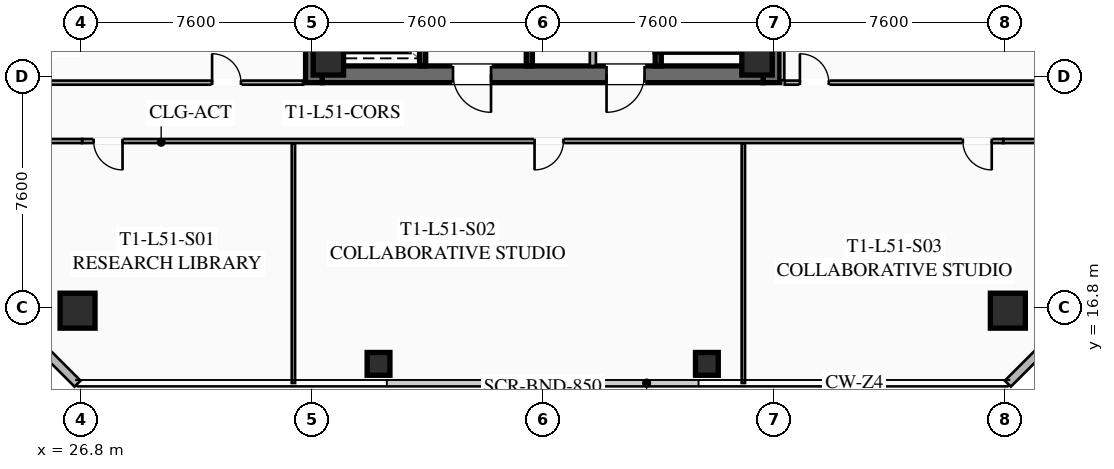
"""IFC4 building model, lengths in metres.
Left out: names, types, materials, properties, quantities, classifications, styles, units other than length and angle.
Written with IfcOpenShell. Run it as: python <this file> out.ifc"""

import sys

from ifc_helpers import new_model, si_unit, direction, frame, frame_2d, origin, origin_2d, place, context, subcontext, project, spatial, rectangle, hollow_rectangle, extrude, element, fill, save


model = new_model("IFC4")
c1 = context("Model", 3, precision=1e-05, world=origin(), true_north=direction((0.0, 1.0)))
c2 = subcontext(c1, "Body", "Model", "MODEL_VIEW")
j1 = project(units=[si_unit("LENGTHUNIT", "METRE"), si_unit("PLANEANGLEUNIT", "RADIAN")], contexts=[c1])
p1 = place(None, origin())
s1 = spatial("IfcSite", under=j1, at=p1, CompositionType="ELEMENT")
p2 = place(p1, origin())
s2 = spatial("IfcBuilding", under=s1, at=p2, CompositionType="ELEMENT")
p3 = place(p2, frame((0.0, 0.0, 188.95)))
s3 = spatial("IfcBuildingStorey", under=s2, at=p3, CompositionType="ELEMENT", Elevation=188.95)
for number, where, z_axis, x_axis in (
    (1, (34.475, 24.2, 0.0), (0.0, 0.0, 1.0), (0.0, 1.0, 0.0)),
    (2, (49.525, 39.8, 0.0), (0.0, 0.0, 1.0), (0.0, -1.0, 0.0)),
):
    element("IfcWall", number, at=place(p3, frame(where, z_axis=z_axis, x_axis=x_axis)), inside=s3, PredefinedType="SHEAR", context=c2, shape_type="SweptSolid", body=[
        extrude(rectangle(XDim=15.6, YDim=0.55, at=frame_2d((7.8, 0.0))), origin(), (0.0, 0.0, 1.0), 3.55),
    ])
p4 = place(p3, frame((49.25, 24.475, 0.0), z_axis=(0.0, 0.0, 1.0), x_axis=(-1.0, 0.0, 0.0)))
e3 = element("IfcWall", 3, at=p4, inside=s3, PredefinedType="SHEAR", context=c2, shape_type="SweptSolid", body=[
    extrude(rectangle(XDim=14.5, YDim=0.55, at=frame_2d((7.25, 0.0))), origin(), (0.0, 0.0, 1.0), 3.55),
])
p5 = place(p4, frame((8.95, 0.0, 0.0)))
e4 = element("IfcOpeningElement", 4, at=p5, cuts=e3, PredefinedType="OPENING", context=c2, shape_type="SweptSolid", body=[
    extrude(rectangle(XDim=1.25, YDim=2.25, at=frame_2d((0.625, 1.125))), frame((0.0, 0.285, 0.0), z_axis=(0.0, -1.0, 0.0), x_axis=(1.0, 0.0, 0.0)), (0.0, 0.0, 1.0), 0.57),
])
p6 = place(p4, frame((3.9, 0.0, 0.0)))
e5 = element("IfcOpeningElement", 5, at=p6, cuts=e3, PredefinedType="OPENING", context=c2, shape_type="SweptSolid", body=[
    extrude(rectangle(XDim=1.25, YDim=2.25, at=frame_2d((0.625, 1.125))), frame((0.0, 0.285, 0.0), z_axis=(0.0, -1.0, 0.0), x_axis=(1.0, 0.0, 0.0)), (0.0, 0.0, 1.0), 0.57),
])
for number, where, z_axis, x_axis in (
    (6, (34.95, 24.95, 0.0), (0.0, 0.0, 1.0), (1.0, 0.0, 0.0)),
    (7, (49.05, 24.95, 0.0), (0.0, 0.0, 1.0), (1.0, 0.0, 0.0)),
):
    element("IfcColumn", number, at=place(p3, frame(where, z_axis=z_axis, x_axis=x_axis)), inside=s3, PredefinedType="COLUMN", context=c2, shape_type="SweptSolid", body=[
        extrude(hollow_rectangle(XDim=1.0, YDim=1.0, WallThickness=0.04, at=origin_2d()), origin(), (0.0, 0.0, 1.0), 3.37),
    ])
for number, where, z_axis, x_axis in (
    (8, (26.7, 16.7, 0.0), (0.0, 0.0, 1.0), (1.0, 0.0, 0.0)),
    (9, (57.3, 16.7, 0.0), (0.0, 0.0, 1.0), (1.0, 0.0, 0.0)),
):
    element("IfcColumn", number, at=place(p3, frame(where, z_axis=z_axis, x_axis=x_axis)), inside=s3, PredefinedType="COLUMN", context=c2, shape_type="SweptSolid", body=[
        extrude(hollow_rectangle(XDim=1.15, YDim=1.15, WallThickness=0.045, at=origin_2d()), origin(), (0.0, 0.0, 1.0), 3.37),
    ])
for number, where, z_axis, x_axis in (
    (10, (36.6, 14.95, 0.0), (0.0, 0.0, 1.0), (1.0, 0.0, 0.0)),
    (11, (47.4, 14.95, 0.0), (0.0, 0.0, 1.0), (1.0, 0.0, 0.0)),
):
    element("IfcColumn", number, at=place(p3, frame(where, z_axis=z_axis, x_axis=x_axis)), inside=s3, PredefinedType="COLUMN", context=c2, shape_type="SweptSolid", body=[
        extrude(hollow_rectangle(XDim=0.75, YDim=0.75, WallThickness=0.032, at=origin_2d()), origin(), (0.0, 0.0, 1.0), 3.37),
    ])
for number, where, z_axis, x_axis in (
    (12, (26.7, 14.3, 0.0), (0.0, 0.0, 1.0), (-0.707, 0.707, 0.0)),
    (13, (59.7, 16.7, 0.0), (0.0, 0.0, 1.0), (-0.707, -0.707, 0.0)),
):
    element("IfcWall", number, at=place(p3, frame(where, z_axis=z_axis, x_axis=x_axis)), inside=s3, PredefinedType="SOLIDWALL", context=c2, shape_type="SweptSolid", body=[
        extrude(rectangle(XDim=3.394, YDim=0.28, at=frame_2d((1.697, 0.0))), origin(), (0.0, 0.0, 1.0), 3.37),
    ])
p7 = place(p3, frame((45.8, 32.8, 0.0), z_axis=(0.0, 0.0, 1.0), x_axis=(0.0, -1.0, 0.0)))
e14 = element("IfcWall", 14, at=p7, inside=s3, PredefinedType="SHEAR", context=c2, shape_type="SweptSolid", body=[
    extrude(rectangle(XDim=8.05, YDim=0.2, at=frame_2d((4.025, 0.0))), origin(), (0.0, 0.0, 1.0), 3.37),
])
p8 = place(p7, frame((0.45, 0.0, 0.0)))
e15 = element("IfcOpeningElement", 15, at=p8, cuts=e14, PredefinedType="OPENING", context=c2, shape_type="SweptSolid", body=[
    extrude(rectangle(XDim=1.15, YDim=2.2, at=frame_2d((0.575, 1.1))), frame((0.0, 0.11, 0.0), z_axis=(0.0, -1.0, 0.0), x_axis=(1.0, 0.0, 0.0)), (0.0, 0.0, 1.0), 0.22),
])
p9 = place(p3, frame((41.56, 24.75, 0.0), z_axis=(0.0, 0.0, 1.0), x_axis=(0.0, 1.0, 0.0)))
e16 = element("IfcWall", 16, at=p9, inside=s3, PredefinedType="SHEAR", context=c2, shape_type="SweptSolid", body=[
    extrude(rectangle(XDim=14.5, YDim=0.2, at=frame_2d((7.25, 0.0))), origin(), (0.0, 0.0, 1.0), 3.37),
])
p10 = place(p3, frame((38.05, 24.75, 0.0), z_axis=(0.0, 0.0, 1.0), x_axis=(0.0, 1.0, 0.0)))
e17 = element("IfcWall", 17, at=p10, inside=s3, PredefinedType="SHEAR", context=c2, shape_type="SweptSolid", body=[
    extrude(rectangle(XDim=6.45, YDim=0.2, at=frame_2d((3.225, 0.0))), origin(), (0.0, 0.0, 1.0), 3.37),
])
p11 = place(p10, frame((4.875, 0.0, 0.0)))
e18 = element("IfcOpeningElement", 18, at=p11, cuts=e17, PredefinedType="OPENING", context=c2, shape_type="SweptSolid", body=[
    extrude(rectangle(XDim=1.3, YDim=2.25, at=frame_2d((0.65, 1.125))), frame((0.0, 0.11, 0.0), z_axis=(0.0, -1.0, 0.0), x_axis=(1.0, 0.0, 0.0)), (0.0, 0.0, 1.0), 0.22),
])
p12 = place(p10, frame((2.875, 0.0, 0.0)))
e19 = element("IfcOpeningElement", 19, at=p12, cuts=e17, PredefinedType="OPENING", context=c2, shape_type="SweptSolid", body=[
    extrude(rectangle(XDim=1.3, YDim=2.25, at=frame_2d((0.65, 1.125))), frame((0.0, 0.11, 0.0), z_axis=(0.0, -1.0, 0.0), x_axis=(1.0, 0.0, 0.0)), (0.0, 0.0, 1.0), 0.22),
])
p13 = place(p10, frame((0.675, 0.0, 0.0)))
e20 = element("IfcOpeningElement", 20, at=p13, cuts=e17, PredefinedType="OPENING", context=c2, shape_type="SweptSolid", body=[
    extrude(rectangle(XDim=1.3, YDim=2.25, at=frame_2d((0.65, 1.125))), frame((0.0, 0.11, 0.0), z_axis=(0.0, -1.0, 0.0), x_axis=(1.0, 0.0, 0.0)), (0.0, 0.0, 1.0), 0.22),
])
p14 = place(p3, frame((43.65, 24.75, 0.0), z_axis=(0.0, 0.0, 1.0), x_axis=(0.0, 1.0, 0.0)))
e21 = element("IfcWall", 21, at=p14, inside=s3, PredefinedType="SOLIDWALL", context=c2, shape_type="SweptSolid", body=[
    extrude(rectangle(XDim=6.9, YDim=0.2, at=frame_2d((3.45, 0.0))), origin(), (0.0, 0.0, 1.0), 2.723),
])
p15 = place(p14, frame((0.85, 0.0, 0.0)))
e22 = element("IfcOpeningElement", 22, at=p15, cuts=e21, PredefinedType="OPENING", context=c2, shape_type="SweptSolid", body=[
    extrude(rectangle(XDim=0.95, YDim=2.05, at=frame_2d((0.475, 1.025))), frame((0.0, 0.11, 0.0), z_axis=(0.0, -1.0, 0.0), x_axis=(1.0, 0.0, 0.0)), (0.0, 0.0, 1.0), 0.22),
])
p16 = place(p14, frame((4.8, 0.0, 0.0)))
e23 = element("IfcOpeningElement", 23, at=p16, cuts=e21, PredefinedType="OPENING", context=c2, shape_type="SweptSolid", body=[
    extrude(rectangle(XDim=1.05, YDim=2.2, at=frame_2d((0.525, 1.1))), frame((0.0, 0.11, 0.0), z_axis=(0.0, -1.0, 0.0), x_axis=(1.0, 0.0, 0.0)), (0.0, 0.0, 1.0), 0.22),
])
p17 = place(p3, frame((57.15, 22.28, 0.0), z_axis=(0.0, 0.0, 1.0), x_axis=(-1.0, 0.0, 0.0)))
e24 = element("IfcWall", 24, at=p17, inside=s3, PredefinedType="PARTITIONING", context=c2, shape_type="SweptSolid", body=[
    extrude(rectangle(XDim=30.3, YDim=0.135, at=frame_2d((15.15, 0.0))), origin(), (0.0, 0.0, 1.0), 2.723),
])
p18 = place(p17, frame((28.97, 0.0, 0.0)))
e25 = element("IfcOpeningElement", 25, at=p18, cuts=e24, PredefinedType="OPENING", context=c2, shape_type="SweptSolid", body=[
    extrude(rectangle(XDim=0.95, YDim=2.05, at=frame_2d((0.475, 1.025))), frame((0.0, 0.077, 0.0), z_axis=(0.0, -1.0, 0.0), x_axis=(1.0, 0.0, 0.0)), (0.0, 0.0, 1.0), 0.155),
])
p19 = place(p17, frame((14.468, 0.0, 0.0)))
e26 = element("IfcOpeningElement", 26, at=p19, cuts=e24, PredefinedType="OPENING", context=c2, shape_type="SweptSolid", body=[
    extrude(rectangle(XDim=0.95, YDim=2.05, at=frame_2d((0.475, 1.025))), frame((0.0, 0.077, 0.0), z_axis=(0.0, -1.0, 0.0), x_axis=(1.0, 0.0, 0.0)), (0.0, 0.0, 1.0), 0.155),
])
p20 = place(p17, frame((0.38, 0.0, 0.0)))
e27 = element("IfcOpeningElement", 27, at=p20, cuts=e24, PredefinedType="OPENING", context=c2, shape_type="SweptSolid", body=[
    extrude(rectangle(XDim=0.95, YDim=2.05, at=frame_2d((0.475, 1.025))), frame((0.0, 0.077, 0.0), z_axis=(0.0, -1.0, 0.0), x_axis=(1.0, 0.0, 0.0)), (0.0, 0.0, 1.0), 0.155),
])
for number, where, z_axis, x_axis in (
    (28, (24.32, 22.28, 0.0), (0.0, 0.0, 1.0), (1.0, 0.0, 0.0)),
    (29, (57.15, 22.28, 0.0), (0.0, 0.0, 1.0), (1.0, 0.0, 0.0)),
):
    element("IfcWall", number, at=place(p3, frame(where, z_axis=z_axis, x_axis=x_axis)), inside=s3, PredefinedType="PARTITIONING", context=c2, shape_type="SweptSolid", body=[
        extrude(rectangle(XDim=2.53, YDim=0.135, at=frame_2d((1.265, 0.0))), origin(), (0.0, 0.0, 1.0), 2.723),
    ])
for number, where, z_axis, x_axis in (
    (30, (33.8, 14.32, 0.0), (0.0, 0.0, 1.0), (0.0, 1.0, 0.0)),
    (31, (48.6, 14.32, 0.0), (0.0, 0.0, 1.0), (0.0, 1.0, 0.0)),
):
    element("IfcWall", number, at=place(p3, frame(where, z_axis=z_axis, x_axis=x_axis)), inside=s3, PredefinedType="PARTITIONING", context=c2, shape_type="SweptSolid", body=[
        extrude(rectangle(XDim=7.88, YDim=0.11, at=frame_2d((3.94, 0.0))), origin(), (0.0, 0.0, 1.0), 2.723),
    ])
p21 = place(p3, frame((49.88, 39.72, 0.0), z_axis=(0.0, 0.0, 1.0), x_axis=(0.0, -1.0, 0.0)))
e32 = element("IfcWall", 32, at=p21, inside=s3, PredefinedType="PARTITIONING", context=c2, shape_type="SweptSolid", body=[
    extrude(rectangle(XDim=15.44, YDim=0.135, at=frame_2d((7.72, 0.0))), origin(), (0.0, 0.0, 1.0), 2.723),
])
p22 = place(p3, frame((49.96, 24.2, 0.0), z_axis=(0.0, 0.0, 1.0), x_axis=(1.0, 0.0, 0.0)))
e33 = element("IfcWall", 33, at=p22, inside=s3, PredefinedType="PARTITIONING", context=c2, shape_type="SweptSolid", body=[
    extrude(rectangle(XDim=9.72, YDim=0.135, at=frame_2d((4.86, 0.0))), origin(), (0.0, 0.0, 1.0), 2.723),
])
p23 = place(p22, frame((0.5, 0.0, 0.0)))
e34 = element("IfcOpeningElement", 34, at=p23, cuts=e33, PredefinedType="OPENING", context=c2, shape_type="SweptSolid", body=[
    extrude(rectangle(XDim=0.95, YDim=2.05, at=frame_2d((0.475, 1.025))), frame((0.0, 0.077, 0.0), z_axis=(0.0, -1.0, 0.0), x_axis=(1.0, 0.0, 0.0)), (0.0, 0.0, 1.0), 0.155),
])
p24 = place(p3, frame((24.47, 24.2, 0.0), z_axis=(0.0, 0.0, 1.0), x_axis=(1.0, 0.0, 0.0)))
e35 = element("IfcWall", 35, at=p24, inside=s3, PredefinedType="PARTITIONING", context=c2, shape_type="SweptSolid", body=[
    extrude(rectangle(XDim=9.65, YDim=0.135, at=frame_2d((4.825, 0.0))), origin(), (0.0, 0.0, 1.0), 2.723),
])
p25 = place(p24, frame((6.655, 0.0, 0.0)))
e36 = element("IfcOpeningElement", 36, at=p25, cuts=e35, PredefinedType="OPENING", context=c2, shape_type="SweptSolid", body=[
    extrude(rectangle(XDim=0.95, YDim=2.05, at=frame_2d((0.475, 1.025))), frame((0.0, 0.077, 0.0), z_axis=(0.0, -1.0, 0.0), x_axis=(1.0, 0.0, 0.0)), (0.0, 0.0, 1.0), 0.155),
])
p26 = place(p5, origin())
e37 = element("IfcDoor", 37, at=p26, inside=s3, OperationType="SINGLE_SWING_LEFT", PredefinedType="DOOR", context=c2, shape_type="SweptSolid", body=[
    extrude(rectangle(XDim=1.25, YDim=2.25, at=frame_2d((0.625, 1.125))), frame((0.0, 0.025, 0.0), z_axis=(0.0, -1.0, 0.0), x_axis=(1.0, 0.0, 0.0)), (0.0, 0.0, 1.0), 0.05),
])
fill(e4, e37)
p27 = place(p6, origin())
e38 = element("IfcDoor", 38, at=p27, inside=s3, OperationType="SINGLE_SWING_RIGHT", PredefinedType="DOOR", context=c2, shape_type="SweptSolid", body=[
    extrude(rectangle(XDim=1.25, YDim=2.25, at=frame_2d((0.625, 1.125))), frame((0.0, 0.025, 0.0), z_axis=(0.0, -1.0, 0.0), x_axis=(1.0, 0.0, 0.0)), (0.0, 0.0, 1.0), 0.05),
])
fill(e5, e38)
p28 = place(p18, origin())
e39 = element("IfcDoor", 39, at=p28, inside=s3, OperationType="SINGLE_SWING_LEFT", PredefinedType="DOOR", context=c2, shape_type="SweptSolid", body=[
    extrude(rectangle(XDim=0.95, YDim=2.05, at=frame_2d((0.475, 1.025))), frame((0.0, 0.025, 0.0), z_axis=(0.0, -1.0, 0.0), x_axis=(1.0, 0.0, 0.0)), (0.0, 0.0, 1.0), 0.05),
])
fill(e25, e39)
p29 = place(p19, origin())
e40 = element("IfcDoor", 40, at=p29, inside=s3, OperationType="SINGLE_SWING_RIGHT", PredefinedType="DOOR", context=c2, shape_type="SweptSolid", body=[
    extrude(rectangle(XDim=0.95, YDim=2.05, at=frame_2d((0.475, 1.025))), frame((0.0, 0.025, 0.0), z_axis=(0.0, -1.0, 0.0), x_axis=(1.0, 0.0, 0.0)), (0.0, 0.0, 1.0), 0.05),
])
fill(e26, e40)
p30 = place(p20, origin())
e41 = element("IfcDoor", 41, at=p30, inside=s3, OperationType="SINGLE_SWING_LEFT", PredefinedType="DOOR", context=c2, shape_type="SweptSolid", body=[
    extrude(rectangle(XDim=0.95, YDim=2.05, at=frame_2d((0.475, 1.025))), frame((0.0, 0.025, 0.0), z_axis=(0.0, -1.0, 0.0), x_axis=(1.0, 0.0, 0.0)), (0.0, 0.0, 1.0), 0.05),
])
fill(e27, e41)
p31 = place(p23, origin())
e42 = element("IfcDoor", 42, at=p31, inside=s3, OperationType="SINGLE_SWING_LEFT", PredefinedType="DOOR", context=c2, shape_type="SweptSolid", body=[
    extrude(rectangle(XDim=0.95, YDim=2.05, at=frame_2d((0.475, 1.025))), frame((0.0, 0.025, 0.0), z_axis=(0.0, -1.0, 0.0), x_axis=(1.0, 0.0, 0.0)), (0.0, 0.0, 1.0), 0.05),
])
fill(e34, e42)
p32 = place(p25, origin())
e43 = element("IfcDoor", 43, at=p32, inside=s3, OperationType="SINGLE_SWING_LEFT", PredefinedType="DOOR", context=c2, shape_type="SweptSolid", body=[
    extrude(rectangle(XDim=0.95, YDim=2.05, at=frame_2d((0.475, 1.025))), frame((0.0, 0.025, 0.0), z_axis=(0.0, -1.0, 0.0), x_axis=(1.0, 0.0, 0.0)), (0.0, 0.0, 1.0), 0.05),
])
fill(e36, e43)
save(model, sys.argv[1])
